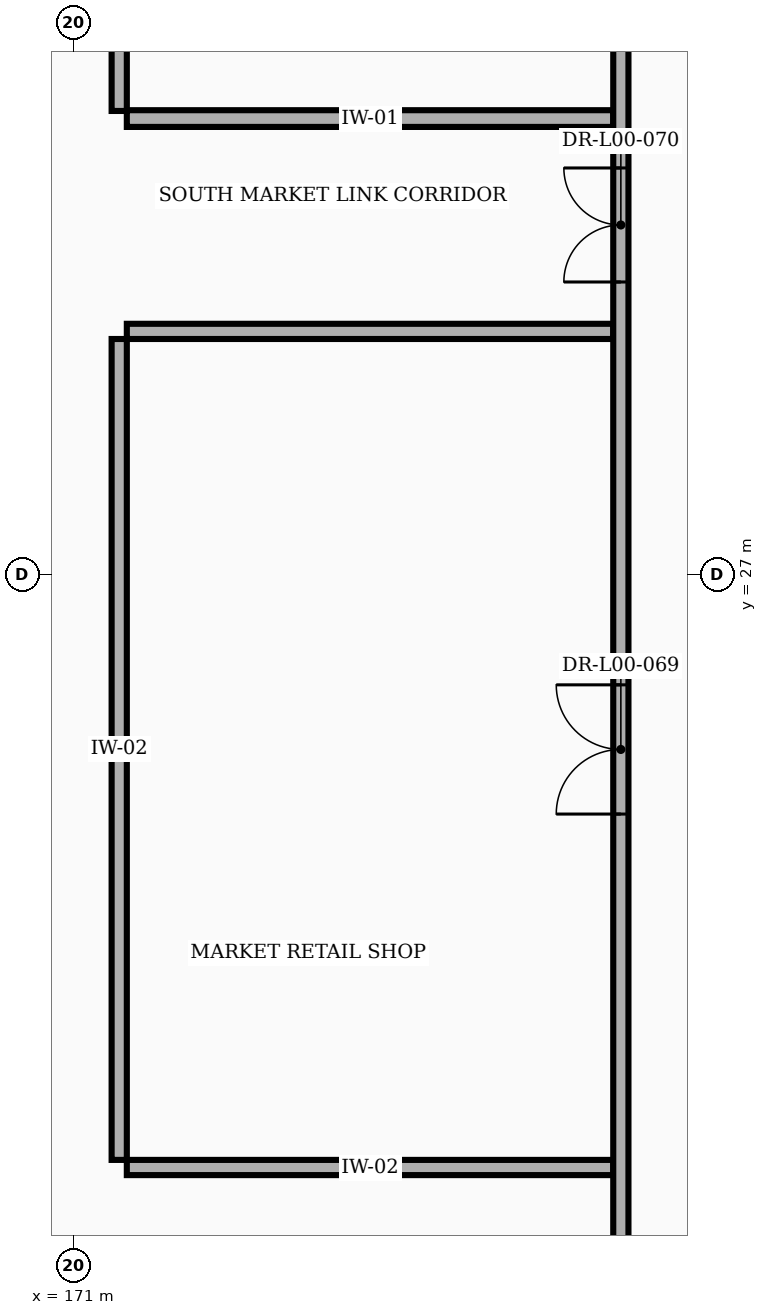
"""IFC4 building model, lengths in metres.
Left out: names, types, materials, properties, quantities, classifications, styles, units other than length and angle.
Written with IfcOpenShell. Run it as: python <this file> out.ifc"""

import sys

from ifc_helpers import new_model, si_unit, direction, frame, frame_2d, origin, place, context, subcontext, project, spatial, rectangle, extrude, element, fill, save


model = new_model("IFC4")
c1 = context("Model", 3, precision=1e-05, world=origin(), true_north=direction((0.0, 1.0)))
c2 = subcontext(c1, "Body", "Model", "MODEL_VIEW")
j1 = project(units=[si_unit("LENGTHUNIT", "METRE"), si_unit("PLANEANGLEUNIT", "RADIAN")], contexts=[c1])
p1 = place(None, origin())
s1 = spatial("IfcSite", under=j1, at=p1, CompositionType="ELEMENT")
p2 = place(p1, origin())
s2 = spatial("IfcBuilding", under=s1, at=p2, CompositionType="ELEMENT")
p3 = place(p2, origin())
s3 = spatial("IfcBuildingStorey", under=s2, at=p3, CompositionType="ELEMENT", Elevation=0.0)
for number, where, z_axis, x_axis in (
    (1, (171.7, 19.2, 0.0), (0.0, 0.0, 1.0), (1.0, 0.0, 0.0)),
    (2, (171.7, 30.2, 0.0), (0.0, 0.0, 1.0), (1.0, 0.0, 0.0)),
):
    element("IfcWall", number, at=place(p3, frame(where, z_axis=z_axis, x_axis=x_axis)), inside=s3, PredefinedType="PARTITIONING", context=c2, shape_type="SweptSolid", body=[
        extrude(rectangle(XDim=6.4, YDim=0.2, at=frame_2d((3.2, 0.0))), origin(), (0.0, 0.0, 1.0), 5.75),
    ])
p4 = place(p3, frame((171.7, 33.0, 0.0), z_axis=(0.0, 0.0, 1.0), x_axis=(1.0, 0.0, 0.0)))
e3 = element("IfcWall", 3, at=p4, inside=s3, PredefinedType="PARTITIONING", context=c2, shape_type="SweptSolid", body=[
    extrude(rectangle(XDim=6.4, YDim=0.22, at=frame_2d((3.2, 0.0))), origin(), (0.0, 0.0, 1.0), 5.75),
])
p5 = place(p3, frame((178.2, 0.145, 0.0), z_axis=(0.0, 0.0, 1.0), x_axis=(0.0, 1.0, 0.0)))
e4 = element("IfcWall", 4, at=p5, inside=s3, PredefinedType="PARTITIONING", context=c2, shape_type="SweptSolid", body=[
    extrude(rectangle(XDim=39.095, YDim=0.2, at=frame_2d((19.547, 0.0))), origin(), (0.0, 0.0, 1.0), 5.75),
])
p6 = place(p5, frame((10.605, 0.0, 0.0)))
e5 = element("IfcOpeningElement", 5, at=p6, cuts=e4, PredefinedType="OPENING", context=c2, shape_type="SweptSolid", body=[
    extrude(rectangle(XDim=1.9, YDim=2.35, at=frame_2d((0.95, 1.175))), frame((0.0, 0.112, 0.0), z_axis=(0.0, -1.0, 0.0), x_axis=(1.0, 0.0, 0.0)), (0.0, 0.0, 1.0), 0.224),
])
p7 = place(p5, frame((23.705, 0.0, 0.0)))
e6 = element("IfcOpeningElement", 6, at=p7, cuts=e4, PredefinedType="OPENING", context=c2, shape_type="SweptSolid", body=[
    extrude(rectangle(XDim=1.7, YDim=2.3, at=frame_2d((0.85, 1.15))), frame((0.0, 0.112, 0.0), z_axis=(0.0, -1.0, 0.0), x_axis=(1.0, 0.0, 0.0)), (0.0, 0.0, 1.0), 0.224),
])
p8 = place(p5, frame((30.705, 0.0, 0.0)))
e7 = element("IfcOpeningElement", 7, at=p8, cuts=e4, PredefinedType="OPENING", context=c2, shape_type="SweptSolid", body=[
    extrude(rectangle(XDim=1.5, YDim=2.2, at=frame_2d((0.75, 1.1))), frame((0.0, 0.112, 0.0), z_axis=(0.0, -1.0, 0.0), x_axis=(1.0, 0.0, 0.0)), (0.0, 0.0, 1.0), 0.224),
])
p9 = place(p5, frame((35.405, 0.0, 0.0)))
e8 = element("IfcOpeningElement", 8, at=p9, cuts=e4, PredefinedType="OPENING", context=c2, shape_type="SweptSolid", body=[
    extrude(rectangle(XDim=1.15, YDim=2.15, at=frame_2d((0.575, 1.075))), frame((0.0, 0.112, 0.0), z_axis=(0.0, -1.0, 0.0), x_axis=(1.0, 0.0, 0.0)), (0.0, 0.0, 1.0), 0.224),
])
p10 = place(p3, frame((171.6, 19.3, 0.0), z_axis=(0.0, 0.0, 1.0), x_axis=(0.0, 1.0, 0.0)))
e9 = element("IfcWall", 9, at=p10, inside=s3, PredefinedType="PARTITIONING", context=c2, shape_type="SweptSolid", body=[
    extrude(rectangle(XDim=10.8, YDim=0.2, at=frame_2d((5.4, 0.0))), origin(), (0.0, 0.0, 1.0), 5.75),
])
p11 = place(p3, frame((171.6, 33.1, 0.0), z_axis=(0.0, 0.0, 1.0), x_axis=(0.0, 1.0, 0.0)))
e10 = element("IfcWall", 10, at=p11, inside=s3, PredefinedType="PARTITIONING", context=c2, shape_type="SweptSolid", body=[
    extrude(rectangle(XDim=6.14, YDim=0.2, at=frame_2d((3.07, 0.0))), origin(), (0.0, 0.0, 1.0), 5.75),
])
p12 = place(p7, origin())
e11 = element("IfcDoor", 11, at=p12, inside=s3, OperationType="DOUBLE_DOOR_SINGLE_SWING", PredefinedType="DOOR", context=c2, shape_type="SweptSolid", body=[
    extrude(rectangle(XDim=1.7, YDim=2.3, at=frame_2d((0.85, 1.15))), frame((0.0, 0.025, 0.0), z_axis=(0.0, -1.0, 0.0), x_axis=(1.0, 0.0, 0.0)), (0.0, 0.0, 1.0), 0.05),
])
fill(e6, e11)
p13 = place(p8, origin())
e12 = element("IfcDoor", 12, at=p13, inside=s3, OperationType="DOUBLE_DOOR_SINGLE_SWING", PredefinedType="DOOR", context=c2, shape_type="SweptSolid", body=[
    extrude(rectangle(XDim=1.5, YDim=2.2, at=frame_2d((0.75, 1.1))), frame((0.0, 0.025, 0.0), z_axis=(0.0, -1.0, 0.0), x_axis=(1.0, 0.0, 0.0)), (0.0, 0.0, 1.0), 0.05),
])
fill(e7, e12)
save(model, sys.argv[1])
